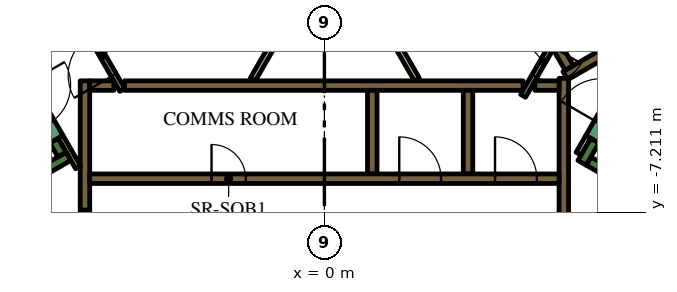
"""IFC4 building model, lengths in metres.
Left out: names, types, materials, properties, quantities, classifications, styles, units other than length and angle.
Written with IfcOpenShell. Run it as: python <this file> out.ifc"""

import sys

from ifc_helpers import new_model, si_unit, direction, frame, frame_2d, origin, place, context, subcontext, project, spatial, rectangle, extrude, element, fill, save


model = new_model("IFC4")
c1 = context("Model", 3, precision=1e-05, world=origin(), true_north=direction((0.0, 1.0)))
c2 = subcontext(c1, "Body", "Model", "MODEL_VIEW")
j1 = project(units=[si_unit("LENGTHUNIT", "METRE"), si_unit("PLANEANGLEUNIT", "RADIAN")], contexts=[c1])
p1 = place(None, origin())
s1 = spatial("IfcSite", under=j1, at=p1, CompositionType="ELEMENT")
p2 = place(p1, origin())
s2 = spatial("IfcBuilding", under=s1, at=p2, CompositionType="ELEMENT")
p3 = place(p2, frame((0.0, 0.0, 47.1)))
s3 = spatial("IfcBuildingStorey", under=s2, at=p3, CompositionType="ELEMENT", Elevation=47.1)
p4 = place(p3, frame((6.776, 13.364, 0.0), z_axis=(0.0, 0.0, 1.0), x_axis=(0.500004177138, -0.8660229921, 0.0)))
e1 = element("IfcWall", 1, at=p4, inside=s3, PredefinedType="SOLIDWALL", context=c2, shape_type="SweptSolid", body=[
    extrude(rectangle(XDim=20.204, YDim=0.9, at=frame_2d((10.102, 0.0))), origin(), (0.0, 0.0, 1.0), 3.9),
])
p5 = place(p3, frame((12.84, -9.261, 0.0), z_axis=(0.0, 0.0, 1.0), x_axis=(-0.866013990052, 0.500019768644, 0.0)))
e2 = element("IfcWall", 2, at=p5, inside=s3, PredefinedType="SOLIDWALL", context=c2, shape_type="SweptSolid", body=[
    extrude(rectangle(XDim=6.8, YDim=0.25, at=frame_2d((3.4, 0.0))), origin(), (0.0, 0.0, 1.0), 3.9),
])
p6 = place(p3, frame((6.78, -5.906, 0.0), z_axis=(0.0, 0.0, 1.0), x_axis=(0.500223362819, 0.865896406789, 0.0)))
e3 = element("IfcWall", 3, at=p6, inside=s3, PredefinedType="SOLIDWALL", context=c2, shape_type="SweptSolid", body=[
    extrude(rectangle(XDim=0.675, YDim=0.25, at=frame_2d((0.337, 0.0))), origin(), (0.0, 0.0, 1.0), 3.9),
])
p7 = place(p3, frame((-12.84, -9.261, 0.0), z_axis=(0.0, 0.0, 1.0), x_axis=(0.866016039709, 0.500016218704, 0.0)))
e4 = element("IfcWall", 4, at=p7, inside=s3, PredefinedType="SOLIDWALL", context=c2, shape_type="SweptSolid", body=[
    extrude(rectangle(XDim=7.05, YDim=0.25, at=frame_2d((3.525, 0.0))), origin(), (0.0, 0.0, 1.0), 3.9),
])
p8 = place(p3, frame((-6.905, -5.69, 0.0), z_axis=(0.0, 0.0, 1.0), x_axis=(-0.500402024738, 0.865793170242, 0.0)))
e5 = element("IfcWall", 5, at=p8, inside=s3, PredefinedType="SOLIDWALL", context=c2, shape_type="SweptSolid", body=[
    extrude(rectangle(XDim=0.425, YDim=0.25, at=frame_2d((0.212, 0.0))), origin(), (0.0, 0.0, 1.0), 3.9),
])
p9 = place(p3, frame((-5.259, -3.875, 0.0), z_axis=(0.0, 0.0, 1.0), x_axis=(1.0, 0.0, 0.0)))
e6 = element("IfcWall", 6, at=p9, inside=s3, PredefinedType="SOLIDWALL", context=c2, shape_type="SweptSolid", body=[
    extrude(rectangle(XDim=10.489, YDim=0.25, at=frame_2d((5.244, 0.0))), origin(), (0.0, 0.0, 1.0), 3.9),
])
for number, where, z_axis, x_axis in (
    (7, (3.78, -4.0, 0.0), (0.0, 0.0, 1.0), (0.0, -1.0, 0.0)),
    (8, (1.26, -4.0, 0.0), (0.0, 0.0, 1.0), (0.0, -1.0, 0.0)),
):
    element("IfcWall", number, at=place(p3, frame(where, z_axis=z_axis, x_axis=x_axis)), inside=s3, PredefinedType="SOLIDWALL", context=c2, shape_type="SweptSolid", body=[
        extrude(rectangle(XDim=2.2, YDim=0.25, at=frame_2d((1.1, 0.0))), origin(), (0.0, 0.0, 1.0), 3.9),
    ])
p10 = place(p3, frame((-6.3, -3.75, 0.0), z_axis=(0.0, 0.0, 1.0), x_axis=(0.0, -1.0, 0.0)))
e9 = element("IfcWall", 9, at=p10, inside=s3, PredefinedType="SOLIDWALL", context=c2, shape_type="SweptSolid", body=[
    extrude(rectangle(XDim=3.404, YDim=0.25, at=frame_2d((1.702, 0.0))), origin(), (0.0, 0.0, 1.0), 3.9),
])
p11 = place(p3, frame((-6.175, -3.875, 0.0), z_axis=(0.0, 0.0, 1.0), x_axis=(1.0, 0.0, 0.0)))
e10 = element("IfcWall", 10, at=p11, inside=s3, PredefinedType="SOLIDWALL", context=c2, shape_type="SweptSolid", body=[
    extrude(rectangle(XDim=0.637, YDim=0.25, at=frame_2d((0.318, 0.0))), origin(), (0.0, 0.0, 1.0), 3.9),
])
p12 = place(p3, frame((6.3, -7.27, 0.0), z_axis=(0.0, 0.0, 1.0), x_axis=(0.0, 1.0, 0.0)))
e11 = element("IfcWall", 11, at=p12, inside=s3, PredefinedType="SOLIDWALL", context=c2, shape_type="SweptSolid", body=[
    extrude(rectangle(XDim=3.586, YDim=0.25, at=frame_2d((1.793, 0.0))), origin(), (0.0, 0.0, 1.0), 3.9),
])
p13 = place(p3, frame((5.538, -3.875, 0.0), z_axis=(0.0, 0.0, 1.0), x_axis=(1.0, 0.0, 0.0)))
e12 = element("IfcWall", 12, at=p13, inside=s3, PredefinedType="SOLIDWALL", context=c2, shape_type="SweptSolid", body=[
    extrude(rectangle(XDim=0.637, YDim=0.25, at=frame_2d((0.318, 0.0))), origin(), (0.0, 0.0, 1.0), 3.9),
])
p14 = place(p3, frame((9.346, -1.879, 0.0), z_axis=(0.0, 0.0, 1.0), x_axis=(-0.866048528039, -0.499959945477, 0.0)))
e13 = element("IfcWall", 13, at=p14, inside=s3, PredefinedType="SOLIDWALL", context=c2, shape_type="SweptSolid", body=[
    extrude(rectangle(XDim=3.47, YDim=0.25, at=frame_2d((1.735, 0.0))), origin(), (0.0, 0.0, 1.0), 3.9),
])
p15 = place(p3, frame((6.13, -2.867, 0.0), z_axis=(0.0, 0.0, 1.0), x_axis=(0.500160776593, -0.865932559475, 0.0)))
e14 = element("IfcWall", 14, at=p15, inside=s3, PredefinedType="SOLIDWALL", context=c2, shape_type="SweptSolid", body=[
    extrude(rectangle(XDim=0.627, YDim=0.25, at=frame_2d((0.313, 0.0))), origin(), (0.0, 0.0, 1.0), 3.9),
])
p16 = place(p3, frame((-6.48, -6.027, 0.0), z_axis=(0.0, 0.0, 1.0), x_axis=(-0.499927229454, 0.866067413802, 0.0)))
e15 = element("IfcWall", 15, at=p16, inside=s3, PredefinedType="PARTITIONING", context=c2, shape_type="SweptSolid", body=[
    extrude(rectangle(XDim=0.929, YDim=0.15, at=frame_2d((0.464, 0.0))), origin(), (0.0, 0.0, 1.0), 3.9),
])
p17 = place(p3, frame((-1.887, -3.718, 0.0), z_axis=(0.0, 0.0, 1.0), x_axis=(0.500057179532, 0.865992388649, 0.0)))
e16 = element("IfcWall", 16, at=p17, inside=s3, PredefinedType="PARTITIONING", context=c2, shape_type="SweptSolid", body=[
    extrude(rectangle(XDim=1.199, YDim=0.15, at=frame_2d((0.6, 0.0))), origin(), (0.0, 0.0, 1.0), 2.75),
])
p18 = place(p3, frame((6.945, -5.222, 0.0), z_axis=(0.0, 0.0, 1.0), x_axis=(-0.499818422106, -0.866130212453, 0.0)))
e17 = element("IfcWall", 17, at=p18, inside=s3, PredefinedType="PARTITIONING", context=c2, shape_type="SweptSolid", body=[
    extrude(rectangle(XDim=0.514, YDim=0.15, at=frame_2d((0.257, 0.0))), origin(), (0.0, 0.0, 1.0), 2.75),
])
p19 = place(p3, frame((2.435, -3.718, 0.0), z_axis=(0.0, 0.0, 1.0), x_axis=(-0.499985176046, 0.866033962229, 0.0)))
e18 = element("IfcWall", 18, at=p19, inside=s3, PredefinedType="PARTITIONING", context=c2, shape_type="SweptSolid", body=[
    extrude(rectangle(XDim=8.875, YDim=0.15, at=frame_2d((4.438, 0.0))), origin(), (0.0, 0.0, 1.0), 2.75),
])
p20 = place(p3, frame((-6.175, -6.325, 0.0), z_axis=(0.0, 0.0, 1.0), x_axis=(1.0, 0.0, 0.0)))
e19 = element("IfcWall", 19, at=p20, inside=s3, PredefinedType="SOLIDWALL", context=c2, shape_type="SweptSolid", body=[
    extrude(rectangle(XDim=12.35, YDim=0.25, at=frame_2d((6.175, 0.0))), origin(), (0.0, 0.0, 1.0), 3.9),
])
p21 = place(p20, frame((3.205, 0.0, 0.0)))
e20 = element("IfcOpeningElement", 20, at=p21, cuts=e19, PredefinedType="OPENING", context=c2, shape_type="SweptSolid", body=[
    extrude(rectangle(XDim=0.9, YDim=2.1, at=frame_2d((0.45, 1.05))), frame((0.0, 0.135, 0.0), z_axis=(0.0, -1.0, 0.0), x_axis=(1.0, 0.0, 0.0)), (0.0, 0.0, 1.0), 0.27),
])
p22 = place(p20, frame((8.145, 0.0, 0.0)))
e21 = element("IfcOpeningElement", 21, at=p22, cuts=e19, PredefinedType="OPENING", context=c2, shape_type="SweptSolid", body=[
    extrude(rectangle(XDim=1.1, YDim=2.1, at=frame_2d((0.55, 1.05))), frame((0.0, 0.135, 0.0), z_axis=(0.0, -1.0, 0.0), x_axis=(1.0, 0.0, 0.0)), (0.0, 0.0, 1.0), 0.27),
])
p23 = place(p20, frame((10.665, 0.0, 0.0)))
e22 = element("IfcOpeningElement", 22, at=p23, cuts=e19, PredefinedType="OPENING", context=c2, shape_type="SweptSolid", body=[
    extrude(rectangle(XDim=1.1, YDim=2.1, at=frame_2d((0.55, 1.05))), frame((0.0, 0.135, 0.0), z_axis=(0.0, -1.0, 0.0), x_axis=(1.0, 0.0, 0.0)), (0.0, 0.0, 1.0), 0.27),
])
p24 = place(p3, frame((7.053, -5.284, 0.0), z_axis=(0.0, 0.0, 1.0), x_axis=(0.500078061341, 0.865980330357, 0.0)))
e23 = element("IfcWall", 23, at=p24, inside=s3, PredefinedType="SOLIDWALL", context=c2, shape_type="SweptSolid", body=[
    extrude(rectangle(XDim=2.1, YDim=0.4, at=frame_2d((1.05, 0.0))), origin(), (0.0, 0.0, 1.0), 3.9),
])
p25 = place(p24, frame((0.45, 0.0, 0.0)))
e24 = element("IfcOpeningElement", 24, at=p25, cuts=e23, PredefinedType="OPENING", context=c2, shape_type="SweptSolid", body=[
    extrude(rectangle(XDim=1.2, YDim=2.1, at=frame_2d((0.6, 1.05))), frame((0.0, 0.21, 0.0), z_axis=(0.0, -1.0, 0.0), x_axis=(1.0, 0.0, 0.0)), (0.0, 0.0, 1.0), 0.42),
])
p26 = place(p3, frame((-8.103, -3.466, 0.0), z_axis=(0.0, 0.0, 1.0), x_axis=(0.500078061341, -0.865980330357, 0.0)))
e25 = element("IfcWall", 25, at=p26, inside=s3, PredefinedType="SOLIDWALL", context=c2, shape_type="SweptSolid", body=[
    extrude(rectangle(XDim=2.1, YDim=0.4, at=frame_2d((1.05, 0.0))), origin(), (0.0, 0.0, 1.0), 3.9),
])
p27 = place(p26, frame((0.45, 0.0, 0.0)))
e26 = element("IfcOpeningElement", 26, at=p27, cuts=e25, PredefinedType="OPENING", context=c2, shape_type="SweptSolid", body=[
    extrude(rectangle(XDim=1.2, YDim=2.1, at=frame_2d((0.6, 1.05))), frame((0.0, 0.21, 0.0), z_axis=(0.0, -1.0, 0.0), x_axis=(1.0, 0.0, 0.0)), (0.0, 0.0, 1.0), 0.42),
])
p28 = place(p3, frame((-6.3, -7.154, 0.0), z_axis=(0.0, 0.0, 1.0), x_axis=(0.0, -1.0, 0.0)))
e27 = element("IfcWall", 27, at=p28, inside=s3, PredefinedType="SOLIDWALL", context=c2, shape_type="SweptSolid", body=[
    extrude(rectangle(XDim=1.8, YDim=0.25, at=frame_2d((0.9, 0.0))), origin(), (0.0, 0.0, 1.0), 3.9),
])
p29 = place(p28, frame((0.45, 0.0, 0.0)))
e28 = element("IfcOpeningElement", 28, at=p29, cuts=e27, PredefinedType="OPENING", context=c2, shape_type="SweptSolid", body=[
    extrude(rectangle(XDim=0.9, YDim=2.1, at=frame_2d((0.45, 1.05))), frame((0.0, 0.135, 0.0), z_axis=(0.0, -1.0, 0.0), x_axis=(1.0, 0.0, 0.0)), (0.0, 0.0, 1.0), 0.27),
])
p30 = place(p3, frame((6.203, -2.456, 0.0), z_axis=(0.0, 0.0, 1.0), x_axis=(-0.500043961785, -0.866000020948, 0.0)))
e29 = element("IfcWall", 29, at=p30, inside=s3, PredefinedType="PARTITIONING", context=c2, shape_type="SweptSolid", body=[
    extrude(rectangle(XDim=1.95, YDim=0.15, at=frame_2d((0.975, 0.0))), origin(), (0.0, 0.0, 1.0), 3.9),
])
p31 = place(p30, frame((0.45, 0.0, 0.0)))
e30 = element("IfcOpeningElement", 30, at=p31, cuts=e29, PredefinedType="OPENING", context=c2, shape_type="SweptSolid", body=[
    extrude(rectangle(XDim=0.9, YDim=2.1, at=frame_2d((0.45, 1.05))), frame((0.0, 0.085, 0.0), z_axis=(0.0, -1.0, 0.0), x_axis=(1.0, 0.0, 0.0)), (0.0, 0.0, 1.0), 0.17),
])
p32 = place(p3, frame((-5.317, -3.99, 0.0), z_axis=(0.0, 0.0, 1.0), x_axis=(-0.500027713859, 0.866009402589, 0.0)))
e31 = element("IfcWall", 31, at=p32, inside=s3, PredefinedType="PARTITIONING", context=c2, shape_type="SweptSolid", body=[
    extrude(rectangle(XDim=2.1, YDim=0.15, at=frame_2d((1.05, 0.0))), origin(), (0.0, 0.0, 1.0), 3.9),
])
p33 = place(p32, frame((0.45, 0.0, 0.0)))
e32 = element("IfcOpeningElement", 32, at=p33, cuts=e31, PredefinedType="OPENING", context=c2, shape_type="SweptSolid", body=[
    extrude(rectangle(XDim=1.2, YDim=2.1, at=frame_2d((0.6, 1.05))), frame((0.0, 0.085, 0.0), z_axis=(0.0, -1.0, 0.0), x_axis=(1.0, 0.0, 0.0)), (0.0, 0.0, 1.0), 0.17),
])
p34 = place(p3, frame((6.163, 18.475, 0.0), z_axis=(0.0, 0.0, 1.0), x_axis=(0.500001317485, -0.866024643133, 0.0)))
e33 = element("IfcWall", 33, at=p34, inside=s3, PredefinedType="PARTITIONING", context=c2, shape_type="SweptSolid", body=[
    extrude(rectangle(XDim=25.767, YDim=0.15, at=frame_2d((12.883, 0.0))), origin(), (0.0, 0.0, 1.0), 2.75),
])
p35 = place(p34, frame((24.586, 0.0, 0.0)))
e34 = element("IfcOpeningElement", 34, at=p35, cuts=e33, PredefinedType="OPENING", context=c2, shape_type="SweptSolid", body=[
    extrude(rectangle(XDim=1.0, YDim=2.1, at=frame_2d((0.5, 1.05))), frame((0.0, 0.085, 0.0), z_axis=(0.0, -1.0, 0.0), x_axis=(1.0, 0.0, 0.0)), (0.0, 0.0, 1.0), 0.17),
])
p36 = place(p34, frame((16.196, 0.0, 0.0)))
e35 = element("IfcOpeningElement", 35, at=p36, cuts=e33, PredefinedType="OPENING", context=c2, shape_type="SweptSolid", body=[
    extrude(rectangle(XDim=1.0, YDim=2.1, at=frame_2d((0.5, 1.05))), frame((0.0, 0.085, 0.0), z_axis=(0.0, -1.0, 0.0), x_axis=(1.0, 0.0, 0.0)), (0.0, 0.0, 1.0), 0.17),
])
p37 = place(p34, frame((14.789, 0.0, 0.0)))
e36 = element("IfcOpeningElement", 36, at=p37, cuts=e33, PredefinedType="OPENING", context=c2, shape_type="SweptSolid", body=[
    extrude(rectangle(XDim=1.1, YDim=2.1, at=frame_2d((0.55, 1.05))), frame((0.0, 0.085, 0.0), z_axis=(0.0, -1.0, 0.0), x_axis=(1.0, 0.0, 0.0)), (0.0, 0.0, 1.0), 0.17),
])
p38 = place(p34, frame((3.698, 0.0, 0.0)))
e37 = element("IfcOpeningElement", 37, at=p38, cuts=e33, PredefinedType="OPENING", context=c2, shape_type="SweptSolid", body=[
    extrude(rectangle(XDim=1.0, YDim=2.1, at=frame_2d((0.5, 1.05))), frame((0.0, 0.085, 0.0), z_axis=(0.0, -1.0, 0.0), x_axis=(1.0, 0.0, 0.0)), (0.0, 0.0, 1.0), 0.17),
])
p39 = place(p34, frame((2.391, 0.0, 0.0)))
e38 = element("IfcOpeningElement", 38, at=p39, cuts=e33, PredefinedType="OPENING", context=c2, shape_type="SweptSolid", body=[
    extrude(rectangle(XDim=1.0, YDim=2.1, at=frame_2d((0.5, 1.05))), frame((0.0, 0.085, 0.0), z_axis=(0.0, -1.0, 0.0), x_axis=(1.0, 0.0, 0.0)), (0.0, 0.0, 1.0), 0.17),
])
p40 = place(p3, frame((-19.081, -3.9, 0.0), z_axis=(0.0, 0.0, 1.0), x_axis=(0.499998313975, 0.866026377209, 0.0)))
e39 = element("IfcWall", 39, at=p40, inside=s3, PredefinedType="PARTITIONING", context=c2, shape_type="SweptSolid", body=[
    extrude(rectangle(XDim=25.766, YDim=0.15, at=frame_2d((12.883, 0.0))), origin(), (0.0, 0.0, 1.0), 2.75),
])
p41 = place(p40, frame((16.196, 0.0, 0.0)))
e40 = element("IfcOpeningElement", 40, at=p41, cuts=e39, PredefinedType="OPENING", context=c2, shape_type="SweptSolid", body=[
    extrude(rectangle(XDim=1.0, YDim=2.1, at=frame_2d((0.5, 1.05))), frame((0.0, 0.085, 0.0), z_axis=(0.0, -1.0, 0.0), x_axis=(1.0, 0.0, 0.0)), (0.0, 0.0, 1.0), 0.17),
])
p42 = place(p40, frame((14.889, 0.0, 0.0)))
e41 = element("IfcOpeningElement", 41, at=p42, cuts=e39, PredefinedType="OPENING", context=c2, shape_type="SweptSolid", body=[
    extrude(rectangle(XDim=1.0, YDim=2.1, at=frame_2d((0.5, 1.05))), frame((0.0, 0.085, 0.0), z_axis=(0.0, -1.0, 0.0), x_axis=(1.0, 0.0, 0.0)), (0.0, 0.0, 1.0), 0.17),
])
p43 = place(p40, frame((3.698, 0.0, 0.0)))
e42 = element("IfcOpeningElement", 42, at=p43, cuts=e39, PredefinedType="OPENING", context=c2, shape_type="SweptSolid", body=[
    extrude(rectangle(XDim=1.1, YDim=2.1, at=frame_2d((0.55, 1.05))), frame((0.0, 0.085, 0.0), z_axis=(0.0, -1.0, 0.0), x_axis=(1.0, 0.0, 0.0)), (0.0, 0.0, 1.0), 0.17),
])
p44 = place(p40, frame((2.392, 0.0, 0.0)))
e43 = element("IfcOpeningElement", 43, at=p44, cuts=e39, PredefinedType="OPENING", context=c2, shape_type="SweptSolid", body=[
    extrude(rectangle(XDim=1.0, YDim=2.1, at=frame_2d((0.5, 1.05))), frame((0.0, 0.085, 0.0), z_axis=(0.0, -1.0, 0.0), x_axis=(1.0, 0.0, 0.0)), (0.0, 0.0, 1.0), 0.17),
])
p45 = place(p21, origin())
e44 = element("IfcDoor", 44, at=p45, inside=s3, OperationType="SINGLE_SWING_LEFT", PredefinedType="DOOR", context=c2, shape_type="SweptSolid", body=[
    extrude(rectangle(XDim=0.9, YDim=2.1, at=frame_2d((0.45, 1.05))), frame((0.0, 0.025, 0.0), z_axis=(0.0, -1.0, 0.0), x_axis=(1.0, 0.0, 0.0)), (0.0, 0.0, 1.0), 0.05),
])
fill(e20, e44)
p46 = place(p22, origin())
e45 = element("IfcDoor", 45, at=p46, inside=s3, OperationType="DOUBLE_DOOR_SLIDING", PredefinedType="DOOR", context=c2, shape_type="SweptSolid", body=[
    extrude(rectangle(XDim=1.1, YDim=2.1, at=frame_2d((0.55, 1.05))), frame((0.0, 0.025, 0.0), z_axis=(0.0, -1.0, 0.0), x_axis=(1.0, 0.0, 0.0)), (0.0, 0.0, 1.0), 0.05),
])
fill(e21, e45)
p47 = place(p23, origin())
e46 = element("IfcDoor", 46, at=p47, inside=s3, OperationType="DOUBLE_DOOR_SLIDING", PredefinedType="DOOR", context=c2, shape_type="SweptSolid", body=[
    extrude(rectangle(XDim=1.1, YDim=2.1, at=frame_2d((0.55, 1.05))), frame((0.0, 0.025, 0.0), z_axis=(0.0, -1.0, 0.0), x_axis=(1.0, 0.0, 0.0)), (0.0, 0.0, 1.0), 0.05),
])
fill(e22, e46)
p48 = place(p31, origin())
e47 = element("IfcDoor", 47, at=p48, inside=s3, OperationType="SINGLE_SWING_LEFT", PredefinedType="DOOR", context=c2, shape_type="SweptSolid", body=[
    extrude(rectangle(XDim=0.9, YDim=2.1, at=frame_2d((0.45, 1.05))), frame((0.0, 0.025, 0.0), z_axis=(0.0, -1.0, 0.0), x_axis=(1.0, 0.0, 0.0)), (0.0, 0.0, 1.0), 0.05),
])
fill(e30, e47)
p49 = place(p33, origin())
e48 = element("IfcDoor", 48, at=p49, inside=s3, OperationType="SINGLE_SWING_LEFT", PredefinedType="DOOR", context=c2, shape_type="SweptSolid", body=[
    extrude(rectangle(XDim=1.2, YDim=2.1, at=frame_2d((0.6, 1.05))), frame((0.0, 0.025, 0.0), z_axis=(0.0, -1.0, 0.0), x_axis=(1.0, 0.0, 0.0)), (0.0, 0.0, 1.0), 0.05),
])
fill(e32, e48)
save(model, sys.argv[1])
